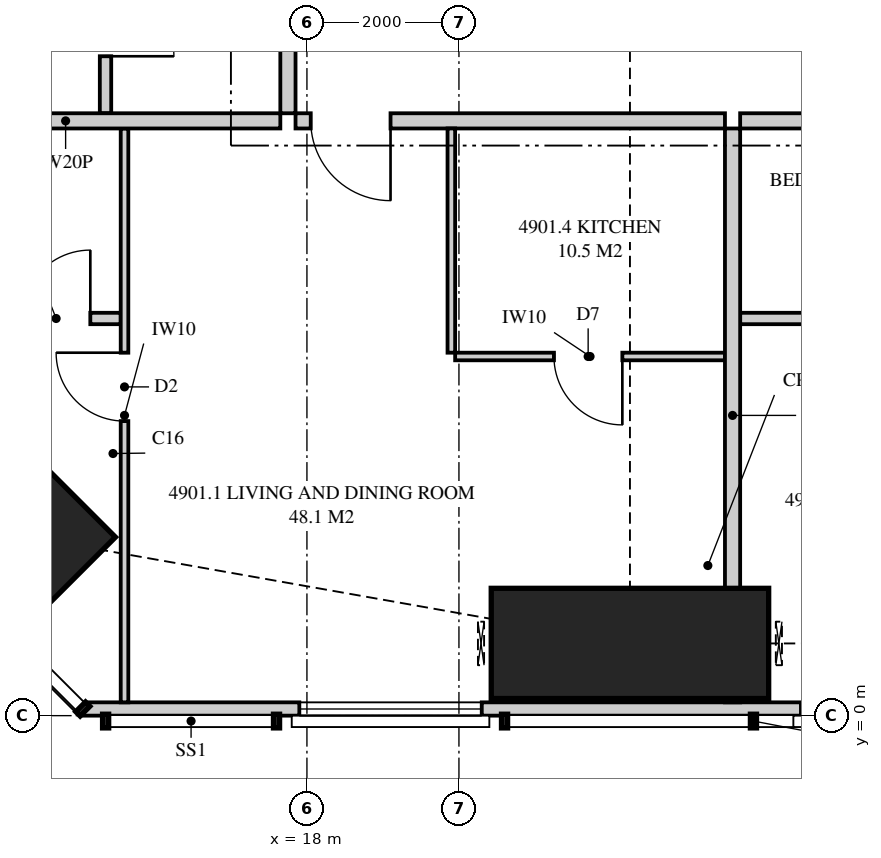
"""IFC4 building model, lengths in metres.
Left out: names, types, materials, properties, quantities, classifications, styles, units other than length and angle.
Written with IfcOpenShell. Run it as: python <this file> out.ifc"""

import sys

from ifc_helpers import new_model, si_unit, direction, frame, frame_2d, origin, origin_2d, place, context, subcontext, project, spatial, polyline, rectangle, outline, extrude, element, fill, save


model = new_model("IFC4")
c1 = context("Model", 3, precision=1e-05, world=origin(), true_north=direction((0.0, 1.0)))
c2 = subcontext(c1, "Body", "Model", "MODEL_VIEW")
j1 = project(units=[si_unit("LENGTHUNIT", "METRE"), si_unit("PLANEANGLEUNIT", "RADIAN")], contexts=[c1])
p1 = place(None, origin())
s1 = spatial("IfcSite", under=j1, at=p1, CompositionType="ELEMENT")
p2 = place(p1, origin())
s2 = spatial("IfcBuilding", under=s1, at=p2, CompositionType="ELEMENT")
p3 = place(p2, frame((0.0, 0.0, 181.15)))
s3 = spatial("IfcBuildingStorey", under=s2, at=p3, CompositionType="ELEMENT", Elevation=181.15)
p4 = place(p3, frame((14.348, 2.348, 0.0), z_axis=(0.0, 0.0, 1.0), x_axis=(0.707106781187, 0.707106781187, 0.0)))
e1 = element("IfcColumn", 1, at=p4, inside=s3, PredefinedType="COLUMN", context=c2, shape_type="SweptSolid", body=[
    extrude(rectangle(XDim=1.6, YDim=1.6, at=origin_2d()), origin(), (0.0, 0.0, 1.0), 3.35),
])
p5 = place(p3, frame((22.25, 0.95, 0.0), z_axis=(0.0, 0.0, 1.0), x_axis=(0.0, 1.0, 0.0)))
e2 = element("IfcColumn", 2, at=p5, inside=s3, PredefinedType="COLUMN", context=c2, shape_type="SweptSolid", body=[
    extrude(rectangle(XDim=1.45, YDim=3.65, at=origin_2d()), origin(), (0.0, 0.0, 1.0), 3.35),
])
p6 = place(p3, frame((15.051, 0.087, 0.0), z_axis=(0.0, 0.0, 1.0), x_axis=(1.0, 0.0, 0.0)))
e3 = element("IfcWall", 3, at=p6, inside=s3, PredefinedType="SOLIDWALL", context=c2, shape_type="SweptSolid", body=[
    extrude(outline(polyline([(0.0, 0.0), (34.897, 0.0), (34.897, 3.11), (27.91, 3.11), (27.91, 2.15), (27.836, 2.15), (27.836, 3.11), (27.699, 3.11), (27.699, 2.15), (7.199, 2.15), (7.199, 3.11), (7.062, 3.11), (7.062, 2.15), (6.987, 2.15), (6.987, 3.11), (0.0, 3.11), (0.0, 0.0)])), frame((0.0, 0.087, 0.0), z_axis=(0.0, -1.0, 0.0), x_axis=(1.0, 0.0, 0.0)), (0.0, 0.0, 1.0), 0.175),
])
p7 = place(p6, frame((2.849, 0.0, 0.4)))
e4 = element("IfcOpeningElement", 4, at=p7, cuts=e3, PredefinedType="OPENING", context=c2, shape_type="SweptSolid", body=[
    extrude(rectangle(XDim=2.4, YDim=1.7, at=frame_2d((1.2, 0.85))), frame((0.0, 0.097, 0.0), z_axis=(0.0, -1.0, 0.0), x_axis=(1.0, 0.0, 0.0)), (0.0, 0.0, 1.0), 0.195),
])
p8 = place(p6, frame((9.449, 0.0, 0.4)))
e5 = element("IfcOpeningElement", 5, at=p8, cuts=e3, PredefinedType="OPENING", context=c2, shape_type="SweptSolid", body=[
    extrude(rectangle(XDim=1.8, YDim=1.7, at=frame_2d((0.9, 0.85))), frame((0.0, 0.097, 0.0), z_axis=(0.0, -1.0, 0.0), x_axis=(1.0, 0.0, 0.0)), (0.0, 0.0, 1.0), 0.195),
])
p9 = place(p6, frame((13.561, 0.0, 0.0)))
e6 = element("IfcOpeningElement", 6, at=p9, cuts=e3, PredefinedType="OPENING", context=c2, shape_type="SweptSolid", body=[
    extrude(rectangle(XDim=1.8, YDim=2.1, at=frame_2d((0.9, 1.05))), frame((0.0, 0.097, 0.0), z_axis=(0.0, -1.0, 0.0), x_axis=(1.0, 0.0, 0.0)), (0.0, 0.0, 1.0), 0.195),
])
p10 = place(p6, frame((20.599, 0.0, 0.4)))
e7 = element("IfcOpeningElement", 7, at=p10, cuts=e3, PredefinedType="OPENING", context=c2, shape_type="SweptSolid", body=[
    extrude(rectangle(XDim=1.8, YDim=1.7, at=frame_2d((0.9, 0.85))), frame((0.0, 0.097, 0.0), z_axis=(0.0, -1.0, 0.0), x_axis=(1.0, 0.0, 0.0)), (0.0, 0.0, 1.0), 0.195),
])
p11 = place(p6, frame((23.974, 0.0, 0.4)))
e8 = element("IfcOpeningElement", 8, at=p11, cuts=e3, PredefinedType="OPENING", context=c2, shape_type="SweptSolid", body=[
    extrude(rectangle(XDim=1.8, YDim=1.7, at=frame_2d((0.9, 0.85))), frame((0.0, 0.097, 0.0), z_axis=(0.0, -1.0, 0.0), x_axis=(1.0, 0.0, 0.0)), (0.0, 0.0, 1.0), 0.195),
])
p12 = place(p6, frame((29.659, 0.0, 0.4)))
e9 = element("IfcOpeningElement", 9, at=p12, cuts=e3, PredefinedType="OPENING", context=c2, shape_type="SweptSolid", body=[
    extrude(rectangle(XDim=2.4, YDim=1.7, at=frame_2d((1.2, 0.85))), frame((0.0, 0.097, 0.0), z_axis=(0.0, -1.0, 0.0), x_axis=(1.0, 0.0, 0.0)), (0.0, 0.0, 1.0), 0.195),
])
p13 = place(p3, frame((23.6, 0.175, 0.0), z_axis=(0.0, 0.0, 1.0), x_axis=(0.0, 1.0, 0.0)))
e10 = element("IfcWall", 10, at=p13, inside=s3, PredefinedType="PARTITIONING", context=c2, shape_type="SweptSolid", body=[
    extrude(outline(polyline([(0.529, 2.15), (0.0, 2.15), (0.0, 0.0), (0.529, 0.0), (0.529, 0.142), (1.021, 0.142), (1.021, 0.0), (7.55, 0.0), (7.55, 3.11), (1.685, 3.11), (1.685, 2.15), (1.021, 2.15), (1.021, 2.008), (0.529, 2.008), (0.529, 2.15)])), frame((0.0, 0.1, 0.0), z_axis=(0.0, -1.0, 0.0), x_axis=(1.0, 0.0, 0.0)), (0.0, 0.0, 1.0), 0.2),
])
p14 = place(p3, frame((17.85, 7.825, 0.0), z_axis=(0.0, 0.0, 1.0), x_axis=(1.0, 0.0, 0.0)))
e11 = element("IfcWall", 11, at=p14, inside=s3, PredefinedType="PARTITIONING", context=c2, shape_type="SweptSolid", body=[
    extrude(outline(polyline([(0.0, 0.0), (5.65, 0.0), (5.65, 3.11), (4.737, 3.11), (4.737, 2.541), (4.062, 2.541), (4.062, 3.11), (0.0, 3.11), (0.0, 0.0)])), frame((0.0, 0.1, 0.0), z_axis=(0.0, -1.0, 0.0), x_axis=(1.0, 0.0, 0.0)), (0.0, 0.0, 1.0), 0.2),
])
p15 = place(p14, frame((0.2, 0.0, 0.0)))
e12 = element("IfcOpeningElement", 12, at=p15, cuts=e11, PredefinedType="OPENING", context=c2, shape_type="SweptSolid", body=[
    extrude(rectangle(XDim=1.05, YDim=2.2, at=frame_2d((0.525, 1.1))), frame((0.0, 0.11, 0.0), z_axis=(0.0, -1.0, 0.0), x_axis=(1.0, 0.0, 0.0)), (0.0, 0.0, 1.0), 0.22),
])
p16 = place(p3, frame((15.6, 0.175, 0.0), z_axis=(0.0, 0.0, 1.0), x_axis=(0.0, 1.0, 0.0)))
e13 = element("IfcWall", 13, at=p16, inside=s3, PredefinedType="PARTITIONING", context=c2, shape_type="SweptSolid", body=[
    extrude(outline(polyline([(0.0, 0.0), (7.55, 0.0), (7.55, 3.11), (2.825, 3.11), (2.825, 2.15), (1.079, 2.15), (1.079, 3.11), (0.0, 3.11), (0.0, 0.0)])), frame((0.0, 0.05, 0.0), z_axis=(0.0, -1.0, 0.0), x_axis=(1.0, 0.0, 0.0)), (0.0, 0.0, 1.0), 0.1),
])
p17 = place(p16, frame((3.7, 0.0, 0.0)))
e14 = element("IfcOpeningElement", 14, at=p17, cuts=e13, PredefinedType="OPENING", context=c2, shape_type="SweptSolid", body=[
    extrude(rectangle(XDim=0.9, YDim=2.1, at=frame_2d((0.45, 1.05))), frame((0.0, 0.06, 0.0), z_axis=(0.0, -1.0, 0.0), x_axis=(1.0, 0.0, 0.0)), (0.0, 0.0, 1.0), 0.12),
])
p18 = place(p3, frame((12.0, 5.225, 0.0), z_axis=(0.0, 0.0, 1.0), x_axis=(1.0, 0.0, 0.0)))
e15 = element("IfcWall", 15, at=p18, inside=s3, PredefinedType="PLUMBINGWALL", context=c2, shape_type="SweptSolid", body=[
    extrude(outline(polyline([(0.0, 0.0), (3.55, 0.0), (3.55, 3.11), (2.863, 3.11), (2.863, 2.15), (1.078, 2.15), (1.078, 3.11), (0.0, 3.11), (0.0, 0.0)])), frame((0.0, 0.075, 0.0), z_axis=(0.0, -1.0, 0.0), x_axis=(1.0, 0.0, 0.0)), (0.0, 0.0, 1.0), 0.15),
])
p19 = place(p18, frame((2.25, 0.0, 0.0)))
e16 = element("IfcOpeningElement", 16, at=p19, cuts=e15, PredefinedType="OPENING", context=c2, shape_type="SweptSolid", body=[
    extrude(rectangle(XDim=0.9, YDim=2.1, at=frame_2d((0.45, 1.05))), frame((0.0, 0.085, 0.0), z_axis=(0.0, -1.0, 0.0), x_axis=(1.0, 0.0, 0.0)), (0.0, 0.0, 1.0), 0.17),
])
p20 = place(p3, frame((19.95, 4.725, 0.0), z_axis=(0.0, 0.0, 1.0), x_axis=(1.0, 0.0, 0.0)))
e17 = element("IfcWall", 17, at=p20, inside=s3, PredefinedType="PARTITIONING", context=c2, shape_type="SweptSolid", body=[
    extrude(outline(polyline([(0.0, 0.0), (3.55, 0.0), (3.55, 3.11), (2.587, 3.11), (2.587, 2.541), (2.013, 2.541), (2.013, 3.11), (0.0, 3.11), (0.0, 0.0)])), frame((0.0, 0.05, 0.0), z_axis=(0.0, -1.0, 0.0), x_axis=(1.0, 0.0, 0.0)), (0.0, 0.0, 1.0), 0.1),
])
p21 = place(p20, frame((1.3, 0.0, 0.0)))
e18 = element("IfcOpeningElement", 18, at=p21, cuts=e17, PredefinedType="OPENING", context=c2, shape_type="SweptSolid", body=[
    extrude(rectangle(XDim=0.9, YDim=2.1, at=frame_2d((0.45, 1.05))), frame((0.0, 0.06, 0.0), z_axis=(0.0, -1.0, 0.0), x_axis=(1.0, 0.0, 0.0)), (0.0, 0.0, 1.0), 0.12),
])
p22 = place(p3, frame((19.9, 4.775, 0.0), z_axis=(0.0, 0.0, 1.0), x_axis=(0.0, 1.0, 0.0)))
e19 = element("IfcWall", 19, at=p22, inside=s3, PredefinedType="PARTITIONING", context=c2, shape_type="SweptSolid", body=[
    extrude(rectangle(XDim=2.95, YDim=0.1, at=frame_2d((1.475, 0.0))), origin(), (0.0, 0.0, 1.0), 3.11),
])
p23 = place(p3, frame((23.7, 7.825, 0.0), z_axis=(0.0, 0.0, 1.0), x_axis=(1.0, 0.0, 0.0)))
e20 = element("IfcWall", 20, at=p23, inside=s3, PredefinedType="PARTITIONING", context=c2, shape_type="SweptSolid", body=[
    extrude(rectangle(XDim=7.675, YDim=0.2, at=frame_2d((3.837, 0.0))), origin(), (0.0, 0.0, 1.0), 3.11),
])
p24 = place(p3, frame((23.7, 5.225, 0.0), z_axis=(0.0, 0.0, 1.0), x_axis=(1.0, 0.0, 0.0)))
e21 = element("IfcWall", 21, at=p24, inside=s3, PredefinedType="PLUMBINGWALL", context=c2, shape_type="SweptSolid", body=[
    extrude(rectangle(XDim=3.45, YDim=0.15, at=frame_2d((1.725, 0.0))), origin(), (0.0, 0.0, 1.0), 3.11),
])
p25 = place(p24, frame((2.15, 0.0, 0.0)))
e22 = element("IfcOpeningElement", 22, at=p25, cuts=e21, PredefinedType="OPENING", context=c2, shape_type="SweptSolid", body=[
    extrude(rectangle(XDim=0.9, YDim=2.1, at=frame_2d((0.45, 1.05))), frame((0.0, 0.085, 0.0), z_axis=(0.0, -1.0, 0.0), x_axis=(1.0, 0.0, 0.0)), (0.0, 0.0, 1.0), 0.17),
])
p26 = place(p3, frame((12.0, 7.825, 0.0), z_axis=(0.0, 0.0, 1.0), x_axis=(1.0, 0.0, 0.0)))
e23 = element("IfcWall", 23, at=p26, inside=s3, PredefinedType="PARTITIONING", context=c2, shape_type="SweptSolid", body=[
    extrude(outline(polyline([(0.0, 0.0), (5.65, 0.0), (5.65, 3.11), (2.547, 3.11), (2.547, 2.15), (0.712, 2.15), (0.712, 3.11), (0.0, 3.11), (0.0, 0.0)])), frame((0.0, 0.1, 0.0), z_axis=(0.0, -1.0, 0.0), x_axis=(1.0, 0.0, 0.0)), (0.0, 0.0, 1.0), 0.2),
])
p27 = place(p3, frame((17.75, 7.925, 0.0), z_axis=(0.0, 0.0, 1.0), x_axis=(0.0, 1.0, 0.0)))
e24 = element("IfcWall", 24, at=p27, inside=s3, PredefinedType="PARTITIONING", context=c2, shape_type="SweptSolid", body=[
    extrude(outline(polyline([(0.0, 0.0), (5.825, 0.0), (5.825, 3.11), (5.412, 3.11), (5.412, 2.541), (4.738, 2.541), (4.738, 3.11), (0.0, 3.11), (0.0, 0.0)])), frame((0.0, 0.1, 0.0), z_axis=(0.0, -1.0, 0.0), x_axis=(1.0, 0.0, 0.0)), (0.0, 0.0, 1.0), 0.2),
])
p28 = place(p27, frame((2.413, 0.0, 0.0)))
e25 = element("IfcOpeningElement", 25, at=p28, cuts=e24, PredefinedType="OPENING", context=c2, shape_type="SweptSolid", body=[
    extrude(rectangle(XDim=1.05, YDim=2.2, at=frame_2d((0.525, 1.1))), frame((0.0, 0.11, 0.0), z_axis=(0.0, -1.0, 0.0), x_axis=(1.0, 0.0, 0.0)), (0.0, 0.0, 1.0), 0.22),
])
p29 = place(p3, frame((15.35, 7.925, 0.0), z_axis=(0.0, 0.0, 1.0), x_axis=(0.0, 1.0, 0.0)))
e26 = element("IfcWall", 26, at=p29, inside=s3, PredefinedType="PLUMBINGWALL", context=c2, shape_type="SweptSolid", body=[
    extrude(rectangle(XDim=2.425, YDim=0.15, at=frame_2d((1.212, 0.0))), origin(), (0.0, 0.0, 1.0), 3.11),
])
p30 = place(p29, frame((0.75, 0.0, 0.0)))
e27 = element("IfcOpeningElement", 27, at=p30, cuts=e26, PredefinedType="OPENING", context=c2, shape_type="SweptSolid", body=[
    extrude(rectangle(XDim=0.9, YDim=2.1, at=frame_2d((0.45, 1.05))), frame((0.0, 0.085, 0.0), z_axis=(0.0, -1.0, 0.0), x_axis=(1.0, 0.0, 0.0)), (0.0, 0.0, 1.0), 0.17),
])
p31 = place(p7, origin())
e28 = element("IfcWindow", 28, at=p31, inside=s3, PartitioningType="SINGLE_PANEL", PredefinedType="WINDOW", context=c2, shape_type="SweptSolid", body=[
    extrude(rectangle(XDim=2.4, YDim=1.7, at=frame_2d((1.2, 0.85))), frame((0.0, 0.03, 0.0), z_axis=(0.0, -1.0, 0.0), x_axis=(1.0, 0.0, 0.0)), (0.0, 0.0, 1.0), 0.06),
])
fill(e4, e28)
p32 = place(p8, origin())
e29 = element("IfcWindow", 29, at=p32, inside=s3, PartitioningType="SINGLE_PANEL", PredefinedType="WINDOW", context=c2, shape_type="SweptSolid", body=[
    extrude(rectangle(XDim=1.8, YDim=1.7, at=frame_2d((0.9, 0.85))), frame((0.0, 0.03, 0.0), z_axis=(0.0, -1.0, 0.0), x_axis=(1.0, 0.0, 0.0)), (0.0, 0.0, 1.0), 0.06),
])
fill(e5, e29)
p33 = place(p15, frame((1.05, 0.0, 0.0), z_axis=(0.0, 0.0, 1.0), x_axis=(-1.0, 0.0, 0.0)))
e30 = element("IfcDoor", 30, at=p33, inside=s3, OperationType="SINGLE_SWING_LEFT", PredefinedType="DOOR", context=c2, shape_type="SweptSolid", body=[
    extrude(rectangle(XDim=1.05, YDim=2.2, at=frame_2d((0.525, 1.1))), frame((0.0, 0.025, 0.0), z_axis=(0.0, -1.0, 0.0), x_axis=(1.0, 0.0, 0.0)), (0.0, 0.0, 1.0), 0.05),
])
fill(e12, e30)
p34 = place(p17, origin())
e31 = element("IfcDoor", 31, at=p34, inside=s3, OperationType="SINGLE_SWING_RIGHT", PredefinedType="DOOR", context=c2, shape_type="SweptSolid", body=[
    extrude(rectangle(XDim=0.9, YDim=2.1, at=frame_2d((0.45, 1.05))), frame((0.0, 0.025, 0.0), z_axis=(0.0, -1.0, 0.0), x_axis=(1.0, 0.0, 0.0)), (0.0, 0.0, 1.0), 0.05),
])
fill(e14, e31)
p35 = place(p19, origin())
e32 = element("IfcDoor", 32, at=p35, inside=s3, OperationType="SINGLE_SWING_RIGHT", PredefinedType="DOOR", context=c2, shape_type="SweptSolid", body=[
    extrude(rectangle(XDim=0.9, YDim=2.1, at=frame_2d((0.45, 1.05))), frame((0.0, 0.025, 0.0), z_axis=(0.0, -1.0, 0.0), x_axis=(1.0, 0.0, 0.0)), (0.0, 0.0, 1.0), 0.05),
])
fill(e16, e32)
p36 = place(p21, frame((0.9, 0.0, 0.0), z_axis=(0.0, 0.0, 1.0), x_axis=(-1.0, 0.0, 0.0)))
e33 = element("IfcDoor", 33, at=p36, inside=s3, OperationType="SINGLE_SWING_LEFT", PredefinedType="DOOR", context=c2, shape_type="SweptSolid", body=[
    extrude(rectangle(XDim=0.9, YDim=2.1, at=frame_2d((0.45, 1.05))), frame((0.0, 0.025, 0.0), z_axis=(0.0, -1.0, 0.0), x_axis=(1.0, 0.0, 0.0)), (0.0, 0.0, 1.0), 0.05),
])
fill(e18, e33)
p37 = place(p30, frame((0.9, 0.0, 0.0), z_axis=(0.0, 0.0, 1.0), x_axis=(-1.0, 0.0, 0.0)))
e34 = element("IfcDoor", 34, at=p37, inside=s3, OperationType="SINGLE_SWING_RIGHT", PredefinedType="DOOR", context=c2, shape_type="SweptSolid", body=[
    extrude(rectangle(XDim=0.9, YDim=2.1, at=frame_2d((0.45, 1.05))), frame((0.0, 0.025, 0.0), z_axis=(0.0, -1.0, 0.0), x_axis=(1.0, 0.0, 0.0)), (0.0, 0.0, 1.0), 0.05),
])
fill(e27, e34)
save(model, sys.argv[1])
